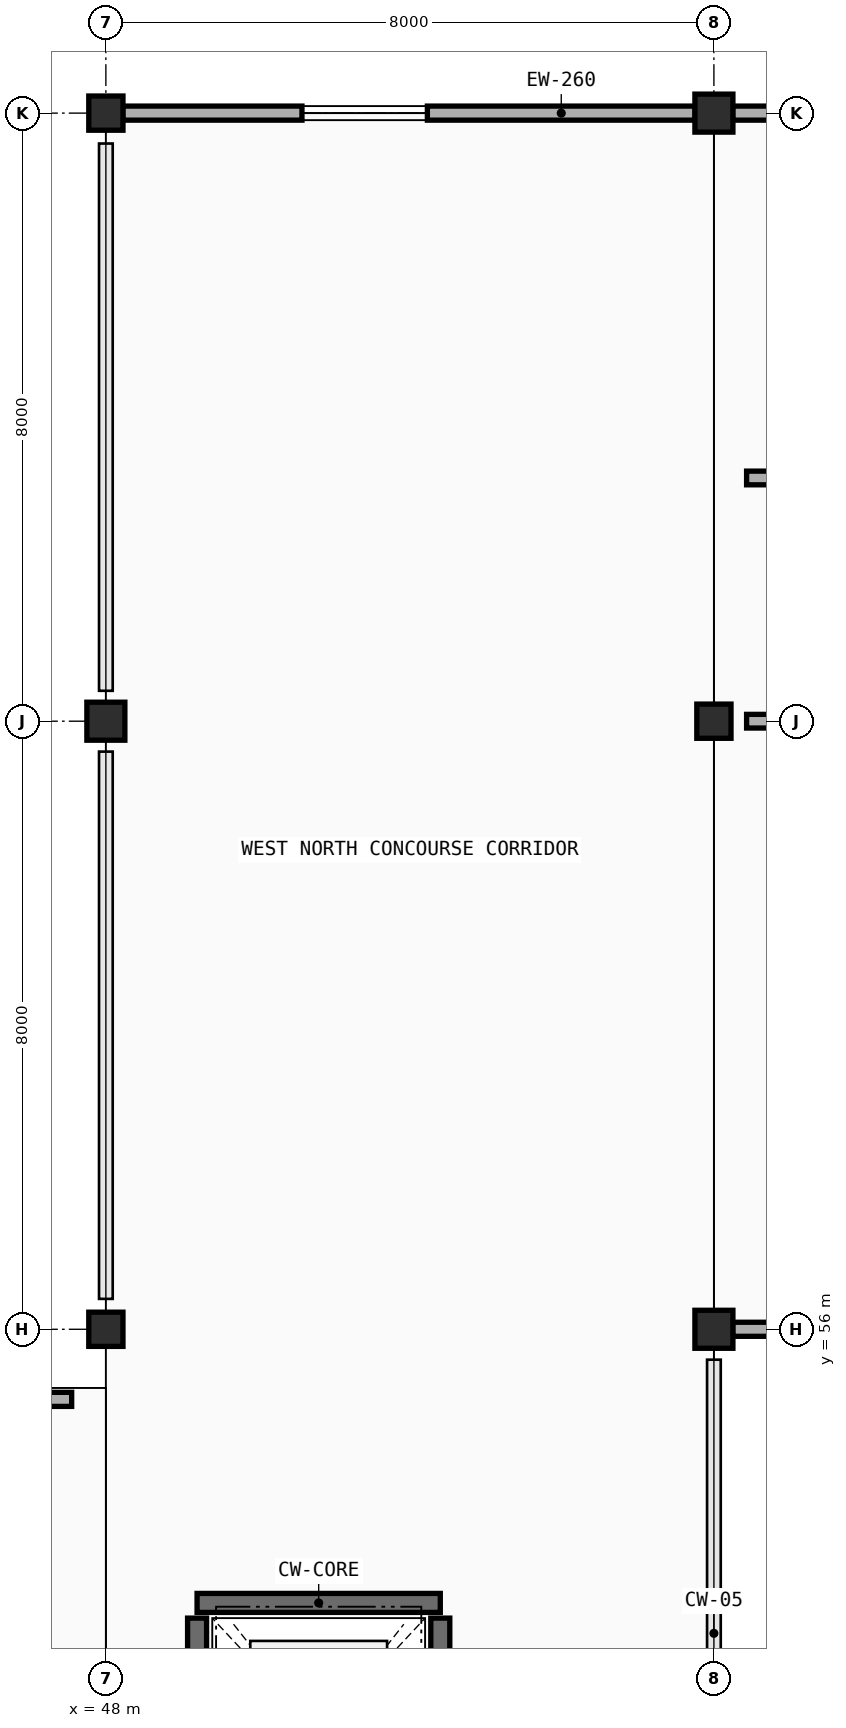
"""IFC4 building model, lengths in metres.
Left out: names, types, materials, properties, quantities, classifications, styles, units other than length and angle.
Written with IfcOpenShell. Run it as: python <this file> out.ifc"""

import sys

from ifc_helpers import new_model, si_unit, direction, frame, frame_2d, origin, origin_2d, place, context, subcontext, project, spatial, rectangle, extrude, element, fill, save


model = new_model("IFC4")
c1 = context("Model", 3, precision=1e-05, world=origin(), true_north=direction((0.0, 1.0)))
c2 = subcontext(c1, "Body", "Model", "MODEL_VIEW")
j1 = project(units=[si_unit("LENGTHUNIT", "METRE"), si_unit("PLANEANGLEUNIT", "RADIAN")], contexts=[c1])
p1 = place(None, origin())
s1 = spatial("IfcSite", under=j1, at=p1, CompositionType="ELEMENT")
p2 = place(p1, origin())
s2 = spatial("IfcBuilding", under=s1, at=p2, CompositionType="ELEMENT")
p3 = place(p2, frame((0.0, 0.0, 18.0)))
s3 = spatial("IfcBuildingStorey", under=s2, at=p3, CompositionType="ELEMENT", Elevation=18.0)
p4 = place(p3, frame((48.0, 56.0, 0.0), z_axis=(0.0, 0.0, 1.0), x_axis=(1.0, 0.0, 0.0)))
e1 = element("IfcColumn", 1, at=p4, inside=s3, PredefinedType="COLUMN", context=c2, shape_type="SweptSolid", body=[
    extrude(rectangle(XDim=0.45, YDim=0.45, at=origin_2d()), origin(), (0.0, 0.0, 1.0), 4.2),
])
for number, where, z_axis, x_axis in (
    (2, (56.0, 56.0, 0.0), (0.0, 0.0, 1.0), (1.0, 0.0, 0.0)),
    (3, (48.0, 64.0, 0.0), (0.0, 0.0, 1.0), (1.0, 0.0, 0.0)),
):
    element("IfcColumn", number, at=place(p3, frame(where, z_axis=z_axis, x_axis=x_axis)), inside=s3, PredefinedType="COLUMN", context=c2, shape_type="SweptSolid", body=[
        extrude(rectangle(XDim=0.5, YDim=0.5, at=origin_2d()), origin(), (0.0, 0.0, 1.0), 4.2),
    ])
for number, where, z_axis, x_axis in (
    (4, (56.0, 64.0, 0.0), (0.0, 0.0, 1.0), (1.0, 0.0, 0.0)),
    (5, (48.0, 72.0, 0.0), (0.0, 0.0, 1.0), (1.0, 0.0, 0.0)),
):
    element("IfcColumn", number, at=place(p3, frame(where, z_axis=z_axis, x_axis=x_axis)), inside=s3, PredefinedType="COLUMN", context=c2, shape_type="SweptSolid", body=[
        extrude(rectangle(XDim=0.45, YDim=0.45, at=origin_2d()), origin(), (0.0, 0.0, 1.0), 4.2),
    ])
p5 = place(p3, frame((56.0, 72.0, 0.0), z_axis=(0.0, 0.0, 1.0), x_axis=(1.0, 0.0, 0.0)))
e6 = element("IfcColumn", 6, at=p5, inside=s3, PredefinedType="COLUMN", context=c2, shape_type="SweptSolid", body=[
    extrude(rectangle(XDim=0.5, YDim=0.5, at=origin_2d()), origin(), (0.0, 0.0, 1.0), 4.2),
])
p6 = place(p3, frame((63.703, 56.0, 0.0), z_axis=(0.0, 0.0, 1.0), x_axis=(-1.0, 0.0, 0.0)))
e7 = element("IfcWall", 7, at=p6, inside=s3, PredefinedType="STANDARD", context=c2, shape_type="SweptSolid", body=[
    extrude(rectangle(XDim=7.456, YDim=0.185, at=frame_2d((3.728, 0.0))), origin(), (0.0, 0.0, 1.0), 3.35),
])
p7 = place(p6, frame((2.283, 0.0, 0.9)))
e8 = element("IfcOpeningElement", 8, at=p7, cuts=e7, PredefinedType="OPENING", context=c2, shape_type="SweptSolid", body=[
    extrude(rectangle(XDim=2.05, YDim=2.0, at=frame_2d((1.025, 1.0))), frame((0.0, 0.103, 0.0), z_axis=(0.0, -1.0, 0.0), x_axis=(1.0, 0.0, 0.0)), (0.0, 0.0, 1.0), 0.205),
])
p8 = place(p3, frame((56.247, 72.0, 0.0), z_axis=(0.0, 0.0, 1.0), x_axis=(1.0, 0.0, 0.0)))
e9 = element("IfcWall", 9, at=p8, inside=s3, PredefinedType="STANDARD", context=c2, shape_type="SweptSolid", body=[
    extrude(rectangle(XDim=7.456, YDim=0.185, at=frame_2d((3.728, 0.0))), origin(), (0.0, 0.0, 1.0), 3.35),
])
p9 = place(p8, frame((2.333, 0.0, 0.9)))
e10 = element("IfcOpeningElement", 10, at=p9, cuts=e9, PredefinedType="OPENING", context=c2, shape_type="SweptSolid", body=[
    extrude(rectangle(XDim=2.45, YDim=2.0, at=frame_2d((1.225, 1.0))), frame((0.0, 0.103, 0.0), z_axis=(0.0, -1.0, 0.0), x_axis=(1.0, 0.0, 0.0)), (0.0, 0.0, 1.0), 0.205),
])
p10 = place(p3, frame((48.222, 72.0, 0.0), z_axis=(0.0, 0.0, 1.0), x_axis=(1.0, 0.0, 0.0)))
e11 = element("IfcWall", 11, at=p10, inside=s3, PredefinedType="STANDARD", context=c2, shape_type="SweptSolid", body=[
    extrude(rectangle(XDim=7.531, YDim=0.185, at=frame_2d((3.766, 0.0))), origin(), (0.0, 0.0, 1.0), 3.35),
])
p11 = place(p10, frame((2.358, 0.0, 0.9)))
e12 = element("IfcOpeningElement", 12, at=p11, cuts=e11, PredefinedType="OPENING", context=c2, shape_type="SweptSolid", body=[
    extrude(rectangle(XDim=1.65, YDim=1.85, at=frame_2d((0.825, 0.925))), frame((0.0, 0.103, 0.0), z_axis=(0.0, -1.0, 0.0), x_axis=(1.0, 0.0, 0.0)), (0.0, 0.0, 1.0), 0.205),
])
p12 = place(p3, frame((42.272, 55.078, 0.0), z_axis=(0.0, 0.0, 1.0), x_axis=(1.0, 0.0, 0.0)))
e13 = element("IfcWall", 13, at=p12, inside=s3, PredefinedType="STANDARD", context=c2, shape_type="SweptSolid", body=[
    extrude(rectangle(XDim=5.278, YDim=0.185, at=frame_2d((2.639, 0.0))), origin(), (0.0, 0.0, 1.0), 3.325),
])
p13 = place(p12, frame((1.978, 0.0, 0.9)))
e14 = element("IfcOpeningElement", 14, at=p13, cuts=e13, PredefinedType="OPENING", context=c2, shape_type="SweptSolid", body=[
    extrude(rectangle(XDim=1.25, YDim=1.25, at=frame_2d((0.625, 0.625))), frame((0.0, 0.103, 0.0), z_axis=(0.0, -1.0, 0.0), x_axis=(1.0, 0.0, 0.0)), (0.0, 0.0, 1.0), 0.205),
])
p14 = place(p3, frame((49.2, 52.4, 0.0), z_axis=(0.0, 0.0, 1.0), x_axis=(1.0, 0.0, 0.0)))
e15 = element("IfcWall", 15, at=p14, inside=s3, PredefinedType="SOLIDWALL", context=c2, shape_type="SweptSolid", body=[
    extrude(rectangle(XDim=3.2, YDim=0.25, at=frame_2d((1.6, 0.0))), origin(), (0.0, 0.0, 1.0), 4.2),
])
for number, where, z_axis, x_axis in (
    (16, (49.2, 49.2, 0.0), (0.0, 0.0, 1.0), (0.0, 1.0, 0.0)),
    (17, (52.4, 49.2, 0.0), (0.0, 0.0, 1.0), (0.0, 1.0, 0.0)),
):
    element("IfcWall", number, at=place(p3, frame(where, z_axis=z_axis, x_axis=x_axis)), inside=s3, PredefinedType="SOLIDWALL", context=c2, shape_type="SweptSolid", body=[
        extrude(rectangle(XDim=3.0, YDim=0.25, at=frame_2d((1.5, 0.0))), origin(), (0.0, 0.0, 1.0), 4.2),
    ])
p15 = place(p3, frame((56.43, 64.0, 0.0), z_axis=(0.0, 0.0, 1.0), x_axis=(1.0, 0.0, 0.0)))
e18 = element("IfcWall", 18, at=p15, inside=s3, PredefinedType="PARTITIONING", context=c2, shape_type="SweptSolid", body=[
    extrude(rectangle(XDim=23.14, YDim=0.18, at=frame_2d((11.57, 0.0))), origin(), (0.0, 0.0, 1.0), 3.3),
])
p16 = place(p15, frame((2.96, 0.0, 0.0)))
e19 = element("IfcOpeningElement", 19, at=p16, cuts=e18, PredefinedType="OPENING", context=c2, shape_type="SweptSolid", body=[
    extrude(rectangle(XDim=1.22, YDim=2.18, at=frame_2d((0.61, 1.09))), frame((0.0, 0.1, 0.0), z_axis=(0.0, -1.0, 0.0), x_axis=(1.0, 0.0, 0.0)), (0.0, 0.0, 1.0), 0.2),
])
p17 = place(p3, frame((56.43, 67.2, 0.0), z_axis=(0.0, 0.0, 1.0), x_axis=(1.0, 0.0, 0.0)))
e20 = element("IfcWall", 20, at=p17, inside=s3, PredefinedType="PARTITIONING", context=c2, shape_type="SweptSolid", body=[
    extrude(rectangle(XDim=31.14, YDim=0.18, at=frame_2d((15.57, 0.0))), origin(), (0.0, 0.0, 1.0), 3.3),
])
p18 = place(p17, frame((2.66, 0.0, 0.0)))
e21 = element("IfcOpeningElement", 21, at=p18, cuts=e20, PredefinedType="OPENING", context=c2, shape_type="SweptSolid", body=[
    extrude(rectangle(XDim=1.82, YDim=2.25, at=frame_2d((0.91, 1.125))), frame((0.0, 0.1, 0.0), z_axis=(0.0, -1.0, 0.0), x_axis=(1.0, 0.0, 0.0)), (0.0, 0.0, 1.0), 0.2),
])
p19 = place(p11, origin())
e22 = element("IfcWindow", 22, at=p19, inside=s3, PartitioningType="DOUBLE_PANEL_VERTICAL", PredefinedType="WINDOW", context=c2, shape_type="SweptSolid", body=[
    extrude(rectangle(XDim=1.65, YDim=1.85, at=frame_2d((0.825, 0.925))), frame((0.0, 0.03, 0.0), z_axis=(0.0, -1.0, 0.0), x_axis=(1.0, 0.0, 0.0)), (0.0, 0.0, 1.0), 0.06),
])
fill(e12, e22)
save(model, sys.argv[1])
